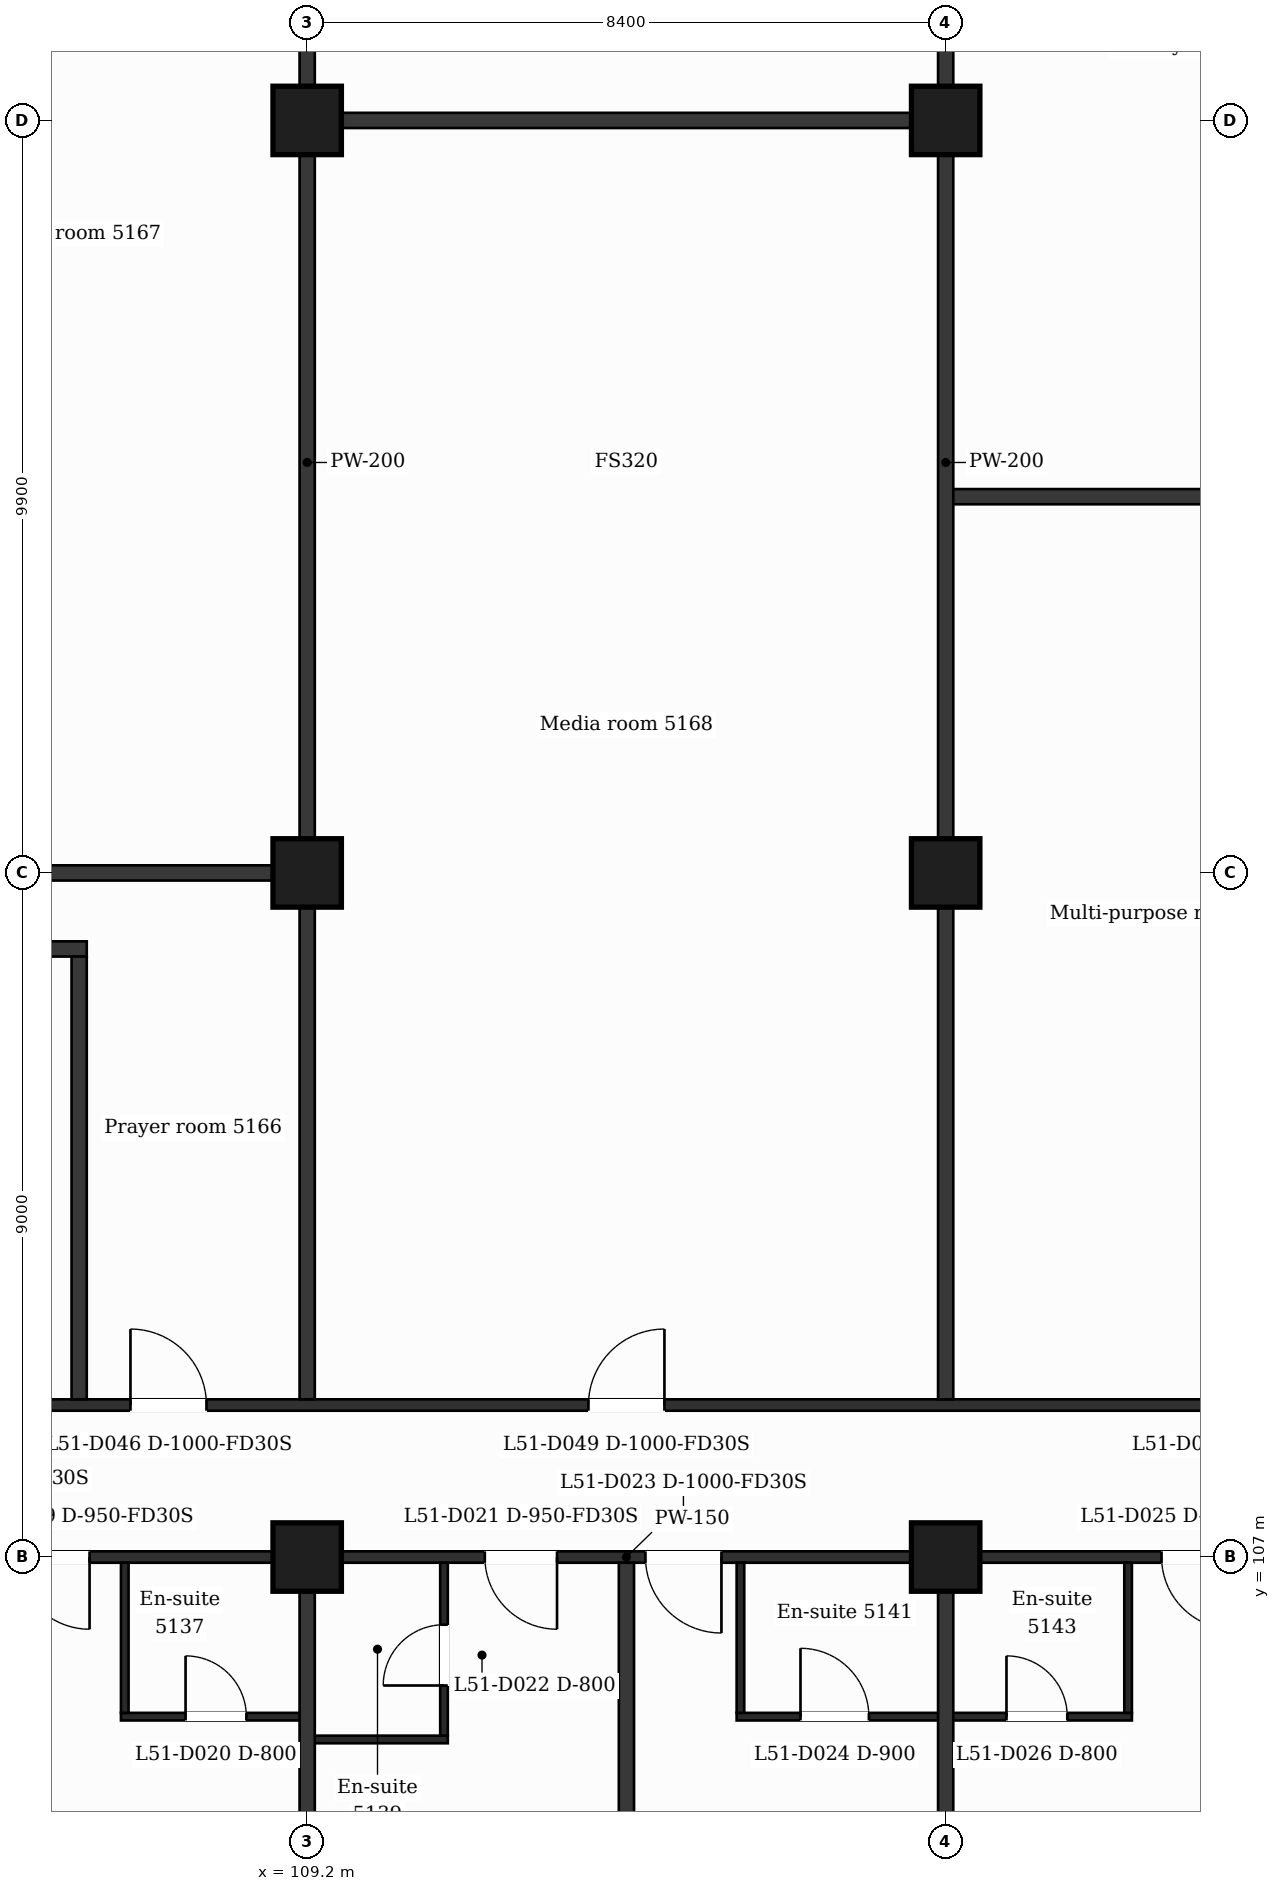
"""IFC4 building model, lengths in metres.
Left out: names, types, materials, properties, quantities, classifications, styles, units other than length and angle.
Written with IfcOpenShell. Run it as: python <this file> out.ifc"""

import sys

from ifc_helpers import new_model, si_unit, direction, frame, frame_2d, origin, origin_2d, place, context, subcontext, project, spatial, rectangle, extrude, element, fill, save


model = new_model("IFC4")
c1 = context("Model", 3, precision=1e-05, world=origin(), true_north=direction((0.0, 1.0)))
c2 = subcontext(c1, "Body", "Model", "MODEL_VIEW")
j1 = project(units=[si_unit("LENGTHUNIT", "METRE"), si_unit("PLANEANGLEUNIT", "RADIAN")], contexts=[c1])
p1 = place(None, origin())
s1 = spatial("IfcSite", under=j1, at=p1, CompositionType="ELEMENT")
p2 = place(p1, origin())
s2 = spatial("IfcBuilding", under=s1, at=p2, CompositionType="ELEMENT")
p3 = place(p2, frame((0.0, 0.0, 213.3)))
s3 = spatial("IfcBuildingStorey", under=s2, at=p3, CompositionType="ELEMENT", Elevation=213.3)
for number, where, z_axis, x_axis in (
    (1, (109.2, 107.0, 0.0), (0.0, 0.0, 1.0), (1.0, 0.0, 0.0)),
    (2, (117.6, 107.0, 0.0), (0.0, 0.0, 1.0), (1.0, 0.0, 0.0)),
    (3, (109.2, 116.0, 0.0), (0.0, 0.0, 1.0), (1.0, 0.0, 0.0)),
    (4, (117.6, 116.0, 0.0), (0.0, 0.0, 1.0), (1.0, 0.0, 0.0)),
    (5, (109.2, 125.9, 0.0), (0.0, 0.0, 1.0), (1.0, 0.0, 0.0)),
    (6, (117.6, 125.9, 0.0), (0.0, 0.0, 1.0), (1.0, 0.0, 0.0)),
):
    element("IfcColumn", number, at=place(p3, frame(where, z_axis=z_axis, x_axis=x_axis)), inside=s3, PredefinedType="COLUMN", context=c2, shape_type="SweptSolid", body=[
        extrude(rectangle(XDim=0.9, YDim=0.9, at=origin_2d()), origin(), (0.0, 0.0, 1.0), 3.7),
    ])
p4 = place(p3, frame((109.2, 104.6, 0.0), z_axis=(0.0, 0.0, 1.0), x_axis=(1.0, 0.0, 0.0)))
e7 = element("IfcWall", 7, at=p4, inside=s3, PredefinedType="PARTITIONING", context=c2, shape_type="SweptSolid", body=[
    extrude(rectangle(XDim=1.85, YDim=0.1, at=frame_2d((0.925, 0.0))), origin(), (0.0, 0.0, 1.0), 3.38),
])
p5 = place(p3, frame((106.75, 104.9, 0.0), z_axis=(0.0, 0.0, 1.0), x_axis=(1.0, 0.0, 0.0)))
e8 = element("IfcWall", 8, at=p5, inside=s3, PredefinedType="PARTITIONING", context=c2, shape_type="SweptSolid", body=[
    extrude(rectangle(XDim=2.45, YDim=0.1, at=frame_2d((1.225, 0.0))), origin(), (0.0, 0.0, 1.0), 3.38),
])
p6 = place(p5, frame((0.85, 0.0, 0.0)))
e9 = element("IfcOpeningElement", 9, at=p6, cuts=e8, PredefinedType="OPENING", context=c2, shape_type="SweptSolid", body=[
    extrude(rectangle(XDim=0.8, YDim=2.1, at=frame_2d((0.4, 1.05))), frame((0.0, 0.06, 0.0), z_axis=(0.0, -1.0, 0.0), x_axis=(1.0, 0.0, 0.0)), (0.0, 0.0, 1.0), 0.12),
])
p7 = place(p3, frame((114.85, 104.9, 0.0), z_axis=(0.0, 0.0, 1.0), x_axis=(1.0, 0.0, 0.0)))
e10 = element("IfcWall", 10, at=p7, inside=s3, PredefinedType="PARTITIONING", context=c2, shape_type="SweptSolid", body=[
    extrude(rectangle(XDim=5.2, YDim=0.1, at=frame_2d((2.6, 0.0))), origin(), (0.0, 0.0, 1.0), 3.38),
])
p8 = place(p7, frame((0.84, 0.0, 0.0)))
e11 = element("IfcOpeningElement", 11, at=p8, cuts=e10, PredefinedType="OPENING", context=c2, shape_type="SweptSolid", body=[
    extrude(rectangle(XDim=0.9, YDim=2.1, at=frame_2d((0.45, 1.05))), frame((0.0, 0.06, 0.0), z_axis=(0.0, -1.0, 0.0), x_axis=(1.0, 0.0, 0.0)), (0.0, 0.0, 1.0), 0.12),
])
p9 = place(p7, frame((3.55, 0.0, 0.0)))
e12 = element("IfcOpeningElement", 12, at=p9, cuts=e10, PredefinedType="OPENING", context=c2, shape_type="SweptSolid", body=[
    extrude(rectangle(XDim=0.8, YDim=2.1, at=frame_2d((0.4, 1.05))), frame((0.0, 0.06, 0.0), z_axis=(0.0, -1.0, 0.0), x_axis=(1.0, 0.0, 0.0)), (0.0, 0.0, 1.0), 0.12),
])
p10 = place(p3, frame((87.018, 107.0, 0.0), z_axis=(0.0, 0.0, 1.0), x_axis=(1.0, 0.0, 0.0)))
e13 = element("IfcWall", 13, at=p10, inside=s3, PredefinedType="PARTITIONING", context=c2, shape_type="SweptSolid", body=[
    extrude(rectangle(XDim=52.765, YDim=0.15, at=frame_2d((26.382, 0.0))), origin(), (0.0, 0.0, 1.0), 3.38),
])
p11 = place(p10, frame((1.276, 0.0, 0.0)))
e14 = element("IfcOpeningElement", 14, at=p11, cuts=e13, PredefinedType="OPENING", context=c2, shape_type="SweptSolid", body=[
    extrude(rectangle(XDim=0.95, YDim=2.1, at=frame_2d((0.475, 1.05))), frame((0.0, 0.085, 0.0), z_axis=(0.0, -1.0, 0.0), x_axis=(1.0, 0.0, 0.0)), (0.0, 0.0, 1.0), 0.17),
])
p12 = place(p10, frame((6.034, 0.0, 0.0)))
e15 = element("IfcOpeningElement", 15, at=p12, cuts=e13, PredefinedType="OPENING", context=c2, shape_type="SweptSolid", body=[
    extrude(rectangle(XDim=0.95, YDim=2.1, at=frame_2d((0.475, 1.05))), frame((0.0, 0.085, 0.0), z_axis=(0.0, -1.0, 0.0), x_axis=(1.0, 0.0, 0.0)), (0.0, 0.0, 1.0), 0.17),
])
p13 = place(p10, frame((15.445, 0.0, 0.0)))
e16 = element("IfcOpeningElement", 16, at=p13, cuts=e13, PredefinedType="OPENING", context=c2, shape_type="SweptSolid", body=[
    extrude(rectangle(XDim=0.95, YDim=2.1, at=frame_2d((0.475, 1.05))), frame((0.0, 0.085, 0.0), z_axis=(0.0, -1.0, 0.0), x_axis=(1.0, 0.0, 0.0)), (0.0, 0.0, 1.0), 0.17),
])
p14 = place(p10, frame((18.369, 0.0, 0.0)))
e17 = element("IfcOpeningElement", 17, at=p14, cuts=e13, PredefinedType="OPENING", context=c2, shape_type="SweptSolid", body=[
    extrude(rectangle(XDim=0.95, YDim=2.1, at=frame_2d((0.475, 1.05))), frame((0.0, 0.085, 0.0), z_axis=(0.0, -1.0, 0.0), x_axis=(1.0, 0.0, 0.0)), (0.0, 0.0, 1.0), 0.17),
])
p15 = place(p10, frame((24.519, 0.0, 0.0)))
e18 = element("IfcOpeningElement", 18, at=p15, cuts=e13, PredefinedType="OPENING", context=c2, shape_type="SweptSolid", body=[
    extrude(rectangle(XDim=0.95, YDim=2.1, at=frame_2d((0.475, 1.05))), frame((0.0, 0.085, 0.0), z_axis=(0.0, -1.0, 0.0), x_axis=(1.0, 0.0, 0.0)), (0.0, 0.0, 1.0), 0.17),
])
p16 = place(p10, frame((26.632, 0.0, 0.0)))
e19 = element("IfcOpeningElement", 19, at=p16, cuts=e13, PredefinedType="OPENING", context=c2, shape_type="SweptSolid", body=[
    extrude(rectangle(XDim=1.0, YDim=2.1, at=frame_2d((0.5, 1.05))), frame((0.0, 0.085, 0.0), z_axis=(0.0, -1.0, 0.0), x_axis=(1.0, 0.0, 0.0)), (0.0, 0.0, 1.0), 0.17),
])
p17 = place(p10, frame((33.422, 0.0, 0.0)))
e20 = element("IfcOpeningElement", 20, at=p17, cuts=e13, PredefinedType="OPENING", context=c2, shape_type="SweptSolid", body=[
    extrude(rectangle(XDim=0.95, YDim=2.1, at=frame_2d((0.475, 1.05))), frame((0.0, 0.085, 0.0), z_axis=(0.0, -1.0, 0.0), x_axis=(1.0, 0.0, 0.0)), (0.0, 0.0, 1.0), 0.17),
])
p18 = place(p10, frame((35.057, 0.0, 0.0)))
e21 = element("IfcOpeningElement", 21, at=p18, cuts=e13, PredefinedType="OPENING", context=c2, shape_type="SweptSolid", body=[
    extrude(rectangle(XDim=0.95, YDim=2.1, at=frame_2d((0.475, 1.05))), frame((0.0, 0.085, 0.0), z_axis=(0.0, -1.0, 0.0), x_axis=(1.0, 0.0, 0.0)), (0.0, 0.0, 1.0), 0.17),
])
p19 = place(p10, frame((44.532, 0.0, 0.0)))
e22 = element("IfcOpeningElement", 22, at=p19, cuts=e13, PredefinedType="OPENING", context=c2, shape_type="SweptSolid", body=[
    extrude(rectangle(XDim=1.0, YDim=2.1, at=frame_2d((0.5, 1.05))), frame((0.0, 0.085, 0.0), z_axis=(0.0, -1.0, 0.0), x_axis=(1.0, 0.0, 0.0)), (0.0, 0.0, 1.0), 0.17),
])
p20 = place(p10, frame((48.249, 0.0, 0.0)))
e23 = element("IfcOpeningElement", 23, at=p20, cuts=e13, PredefinedType="OPENING", context=c2, shape_type="SweptSolid", body=[
    extrude(rectangle(XDim=0.95, YDim=2.1, at=frame_2d((0.475, 1.05))), frame((0.0, 0.085, 0.0), z_axis=(0.0, -1.0, 0.0), x_axis=(1.0, 0.0, 0.0)), (0.0, 0.0, 1.0), 0.17),
])
p21 = place(p3, frame((100.725, 109.0, 0.0), z_axis=(0.0, 0.0, 1.0), x_axis=(1.0, 0.0, 0.0)))
e24 = element("IfcWall", 24, at=p21, inside=s3, PredefinedType="PARTITIONING", context=c2, shape_type="SweptSolid", body=[
    extrude(rectangle(XDim=25.35, YDim=0.15, at=frame_2d((12.675, 0.0))), origin(), (0.0, 0.0, 1.0), 3.38),
])
p22 = place(p21, frame((6.15, 0.0, 0.0)))
e25 = element("IfcOpeningElement", 25, at=p22, cuts=e24, PredefinedType="OPENING", context=c2, shape_type="SweptSolid", body=[
    extrude(rectangle(XDim=1.0, YDim=2.1, at=frame_2d((0.5, 1.05))), frame((0.0, 0.085, 0.0), z_axis=(0.0, -1.0, 0.0), x_axis=(1.0, 0.0, 0.0)), (0.0, 0.0, 1.0), 0.17),
])
p23 = place(p21, frame((3.475, 0.0, 0.0)))
e26 = element("IfcOpeningElement", 26, at=p23, cuts=e24, PredefinedType="OPENING", context=c2, shape_type="SweptSolid", body=[
    extrude(rectangle(XDim=1.0, YDim=2.1, at=frame_2d((0.5, 1.05))), frame((0.0, 0.085, 0.0), z_axis=(0.0, -1.0, 0.0), x_axis=(1.0, 0.0, 0.0)), (0.0, 0.0, 1.0), 0.17),
])
p24 = place(p21, frame((12.175, 0.0, 0.0)))
e27 = element("IfcOpeningElement", 27, at=p24, cuts=e24, PredefinedType="OPENING", context=c2, shape_type="SweptSolid", body=[
    extrude(rectangle(XDim=1.0, YDim=2.1, at=frame_2d((0.5, 1.05))), frame((0.0, 0.085, 0.0), z_axis=(0.0, -1.0, 0.0), x_axis=(1.0, 0.0, 0.0)), (0.0, 0.0, 1.0), 0.17),
])
p25 = place(p21, frame((20.45, 0.0, 0.0)))
e28 = element("IfcOpeningElement", 28, at=p25, cuts=e24, PredefinedType="OPENING", context=c2, shape_type="SweptSolid", body=[
    extrude(rectangle(XDim=1.0, YDim=2.1, at=frame_2d((0.5, 1.05))), frame((0.0, 0.085, 0.0), z_axis=(0.0, -1.0, 0.0), x_axis=(1.0, 0.0, 0.0)), (0.0, 0.0, 1.0), 0.17),
])
p26 = place(p3, frame((103.2, 115.0, 0.0), z_axis=(0.0, 0.0, 1.0), x_axis=(1.0, 0.0, 0.0)))
e29 = element("IfcWall", 29, at=p26, inside=s3, PredefinedType="PARTITIONING", context=c2, shape_type="SweptSolid", body=[
    extrude(rectangle(XDim=3.1, YDim=0.2, at=frame_2d((1.55, 0.0))), origin(), (0.0, 0.0, 1.0), 3.38),
])
for number, where, z_axis, x_axis in (
    (30, (103.2, 116.0, 0.0), (0.0, 0.0, 1.0), (1.0, 0.0, 0.0)),
    (31, (117.6, 120.95, 0.0), (0.0, 0.0, 1.0), (1.0, 0.0, 0.0)),
):
    element("IfcWall", number, at=place(p3, frame(where, z_axis=z_axis, x_axis=x_axis)), inside=s3, PredefinedType="PARTITIONING", context=c2, shape_type="SweptSolid", body=[
        extrude(rectangle(XDim=6.0, YDim=0.2, at=frame_2d((3.0, 0.0))), origin(), (0.0, 0.0, 1.0), 3.38),
    ])
p27 = place(p3, frame((109.2, 125.9, 0.0), z_axis=(0.0, 0.0, 1.0), x_axis=(1.0, 0.0, 0.0)))
e32 = element("IfcWall", 32, at=p27, inside=s3, PredefinedType="PARTITIONING", context=c2, shape_type="SweptSolid", body=[
    extrude(rectangle(XDim=8.4, YDim=0.2, at=frame_2d((4.2, 0.0))), origin(), (0.0, 0.0, 1.0), 3.38),
])
p28 = place(p3, frame((106.2, 109.075, 0.0), z_axis=(0.0, 0.0, 1.0), x_axis=(0.0, 1.0, 0.0)))
e33 = element("IfcWall", 33, at=p28, inside=s3, PredefinedType="PARTITIONING", context=c2, shape_type="SweptSolid", body=[
    extrude(rectangle(XDim=5.825, YDim=0.2, at=frame_2d((2.913, 0.0))), origin(), (0.0, 0.0, 1.0), 3.38),
])
p29 = place(p3, frame((106.8, 104.95, 0.0), z_axis=(0.0, 0.0, 1.0), x_axis=(0.0, 1.0, 0.0)))
e34 = element("IfcWall", 34, at=p29, inside=s3, PredefinedType="PARTITIONING", context=c2, shape_type="SweptSolid", body=[
    extrude(rectangle(XDim=1.975, YDim=0.1, at=frame_2d((0.988, 0.0))), origin(), (0.0, 0.0, 1.0), 3.38),
])
p30 = place(p3, frame((109.2, 99.79, 0.0), z_axis=(0.0, 0.0, 1.0), x_axis=(0.0, 1.0, 0.0)))
e35 = element("IfcWall", 35, at=p30, inside=s3, PredefinedType="PARTITIONING", context=c2, shape_type="SweptSolid", body=[
    extrude(rectangle(XDim=7.135, YDim=0.2, at=frame_2d((3.567, 0.0))), origin(), (0.0, 0.0, 1.0), 3.38),
])
p31 = place(p3, frame((109.2, 109.075, 0.0), z_axis=(0.0, 0.0, 1.0), x_axis=(0.0, 1.0, 0.0)))
e36 = element("IfcWall", 36, at=p31, inside=s3, PredefinedType="PARTITIONING", context=c2, shape_type="SweptSolid", body=[
    extrude(rectangle(XDim=24.65, YDim=0.2, at=frame_2d((12.325, 0.0))), origin(), (0.0, 0.0, 1.0), 3.38),
])
p32 = place(p3, frame((111.0, 104.65, 0.0), z_axis=(0.0, 0.0, 1.0), x_axis=(0.0, 1.0, 0.0)))
e37 = element("IfcWall", 37, at=p32, inside=s3, PredefinedType="PARTITIONING", context=c2, shape_type="SweptSolid", body=[
    extrude(rectangle(XDim=2.275, YDim=0.1, at=frame_2d((1.138, 0.0))), origin(), (0.0, 0.0, 1.0), 3.38),
])
p33 = place(p32, frame((0.66, 0.0, 0.0)))
e38 = element("IfcOpeningElement", 38, at=p33, cuts=e37, PredefinedType="OPENING", context=c2, shape_type="SweptSolid", body=[
    extrude(rectangle(XDim=0.8, YDim=2.1, at=frame_2d((0.4, 1.05))), frame((0.0, 0.06, 0.0), z_axis=(0.0, -1.0, 0.0), x_axis=(1.0, 0.0, 0.0)), (0.0, 0.0, 1.0), 0.12),
])
p34 = place(p3, frame((113.4, 99.79, 0.0), z_axis=(0.0, 0.0, 1.0), x_axis=(0.0, 1.0, 0.0)))
e39 = element("IfcWall", 39, at=p34, inside=s3, PredefinedType="PARTITIONING", context=c2, shape_type="SweptSolid", body=[
    extrude(rectangle(XDim=7.135, YDim=0.2, at=frame_2d((3.567, 0.0))), origin(), (0.0, 0.0, 1.0), 3.38),
])
p35 = place(p3, frame((114.9, 104.95, 0.0), z_axis=(0.0, 0.0, 1.0), x_axis=(0.0, 1.0, 0.0)))
e40 = element("IfcWall", 40, at=p35, inside=s3, PredefinedType="PARTITIONING", context=c2, shape_type="SweptSolid", body=[
    extrude(rectangle(XDim=1.975, YDim=0.1, at=frame_2d((0.988, 0.0))), origin(), (0.0, 0.0, 1.0), 3.38),
])
p36 = place(p3, frame((117.6, 99.79, 0.0), z_axis=(0.0, 0.0, 1.0), x_axis=(0.0, 1.0, 0.0)))
e41 = element("IfcWall", 41, at=p36, inside=s3, PredefinedType="PARTITIONING", context=c2, shape_type="SweptSolid", body=[
    extrude(rectangle(XDim=7.135, YDim=0.2, at=frame_2d((3.567, 0.0))), origin(), (0.0, 0.0, 1.0), 3.38),
])
p37 = place(p3, frame((117.6, 109.075, 0.0), z_axis=(0.0, 0.0, 1.0), x_axis=(0.0, 1.0, 0.0)))
e42 = element("IfcWall", 42, at=p37, inside=s3, PredefinedType="PARTITIONING", context=c2, shape_type="SweptSolid", body=[
    extrude(rectangle(XDim=24.65, YDim=0.2, at=frame_2d((12.325, 0.0))), origin(), (0.0, 0.0, 1.0), 3.38),
])
p38 = place(p3, frame((120.0, 104.95, 0.0), z_axis=(0.0, 0.0, 1.0), x_axis=(0.0, 1.0, 0.0)))
e43 = element("IfcWall", 43, at=p38, inside=s3, PredefinedType="PARTITIONING", context=c2, shape_type="SweptSolid", body=[
    extrude(rectangle(XDim=1.975, YDim=0.1, at=frame_2d((0.988, 0.0))), origin(), (0.0, 0.0, 1.0), 3.38),
])
p39 = place(p14, origin())
e44 = element("IfcDoor", 44, at=p39, inside=s3, OperationType="SINGLE_SWING_RIGHT", PredefinedType="DOOR", context=c2, shape_type="SweptSolid", body=[
    extrude(rectangle(XDim=0.95, YDim=2.1, at=frame_2d((0.475, 1.05))), frame((0.0, 0.025, 0.0), z_axis=(0.0, -1.0, 0.0), x_axis=(1.0, 0.0, 0.0)), (0.0, 0.0, 1.0), 0.05),
])
fill(e17, e44)
p40 = place(p6, origin())
e45 = element("IfcDoor", 45, at=p40, inside=s3, OperationType="SINGLE_SWING_LEFT", PredefinedType="DOOR", context=c2, shape_type="SweptSolid", body=[
    extrude(rectangle(XDim=0.8, YDim=2.1, at=frame_2d((0.4, 1.05))), frame((0.0, 0.025, 0.0), z_axis=(0.0, -1.0, 0.0), x_axis=(1.0, 0.0, 0.0)), (0.0, 0.0, 1.0), 0.05),
])
fill(e9, e45)
p41 = place(p15, origin())
e46 = element("IfcDoor", 46, at=p41, inside=s3, OperationType="SINGLE_SWING_RIGHT", PredefinedType="DOOR", context=c2, shape_type="SweptSolid", body=[
    extrude(rectangle(XDim=0.95, YDim=2.1, at=frame_2d((0.475, 1.05))), frame((0.0, 0.025, 0.0), z_axis=(0.0, -1.0, 0.0), x_axis=(1.0, 0.0, 0.0)), (0.0, 0.0, 1.0), 0.05),
])
fill(e18, e46)
p42 = place(p33, origin())
e47 = element("IfcDoor", 47, at=p42, inside=s3, OperationType="SINGLE_SWING_LEFT", PredefinedType="DOOR", context=c2, shape_type="SweptSolid", body=[
    extrude(rectangle(XDim=0.8, YDim=2.1, at=frame_2d((0.4, 1.05))), frame((0.0, 0.025, 0.0), z_axis=(0.0, -1.0, 0.0), x_axis=(1.0, 0.0, 0.0)), (0.0, 0.0, 1.0), 0.05),
])
fill(e38, e47)
p43 = place(p16, origin())
e48 = element("IfcDoor", 48, at=p43, inside=s3, OperationType="SINGLE_SWING_RIGHT", PredefinedType="DOOR", context=c2, shape_type="SweptSolid", body=[
    extrude(rectangle(XDim=1.0, YDim=2.1, at=frame_2d((0.5, 1.05))), frame((0.0, 0.025, 0.0), z_axis=(0.0, -1.0, 0.0), x_axis=(1.0, 0.0, 0.0)), (0.0, 0.0, 1.0), 0.05),
])
fill(e19, e48)
p44 = place(p8, origin())
e49 = element("IfcDoor", 49, at=p44, inside=s3, OperationType="SINGLE_SWING_LEFT", PredefinedType="DOOR", context=c2, shape_type="SweptSolid", body=[
    extrude(rectangle(XDim=0.9, YDim=2.1, at=frame_2d((0.45, 1.05))), frame((0.0, 0.025, 0.0), z_axis=(0.0, -1.0, 0.0), x_axis=(1.0, 0.0, 0.0)), (0.0, 0.0, 1.0), 0.05),
])
fill(e11, e49)
p45 = place(p17, origin())
e50 = element("IfcDoor", 50, at=p45, inside=s3, OperationType="SINGLE_SWING_RIGHT", PredefinedType="DOOR", context=c2, shape_type="SweptSolid", body=[
    extrude(rectangle(XDim=0.95, YDim=2.1, at=frame_2d((0.475, 1.05))), frame((0.0, 0.025, 0.0), z_axis=(0.0, -1.0, 0.0), x_axis=(1.0, 0.0, 0.0)), (0.0, 0.0, 1.0), 0.05),
])
fill(e20, e50)
p46 = place(p9, origin())
e51 = element("IfcDoor", 51, at=p46, inside=s3, OperationType="SINGLE_SWING_LEFT", PredefinedType="DOOR", context=c2, shape_type="SweptSolid", body=[
    extrude(rectangle(XDim=0.8, YDim=2.1, at=frame_2d((0.4, 1.05))), frame((0.0, 0.025, 0.0), z_axis=(0.0, -1.0, 0.0), x_axis=(1.0, 0.0, 0.0)), (0.0, 0.0, 1.0), 0.05),
])
fill(e12, e51)
p47 = place(p22, origin())
e52 = element("IfcDoor", 52, at=p47, inside=s3, OperationType="SINGLE_SWING_LEFT", PredefinedType="DOOR", context=c2, shape_type="SweptSolid", body=[
    extrude(rectangle(XDim=1.0, YDim=2.1, at=frame_2d((0.5, 1.05))), frame((0.0, 0.025, 0.0), z_axis=(0.0, -1.0, 0.0), x_axis=(1.0, 0.0, 0.0)), (0.0, 0.0, 1.0), 0.05),
])
fill(e25, e52)
p48 = place(p24, origin())
e53 = element("IfcDoor", 53, at=p48, inside=s3, OperationType="SINGLE_SWING_RIGHT", PredefinedType="DOOR", context=c2, shape_type="SweptSolid", body=[
    extrude(rectangle(XDim=1.0, YDim=2.1, at=frame_2d((0.5, 1.05))), frame((0.0, 0.025, 0.0), z_axis=(0.0, -1.0, 0.0), x_axis=(1.0, 0.0, 0.0)), (0.0, 0.0, 1.0), 0.05),
])
fill(e27, e53)
save(model, sys.argv[1])
